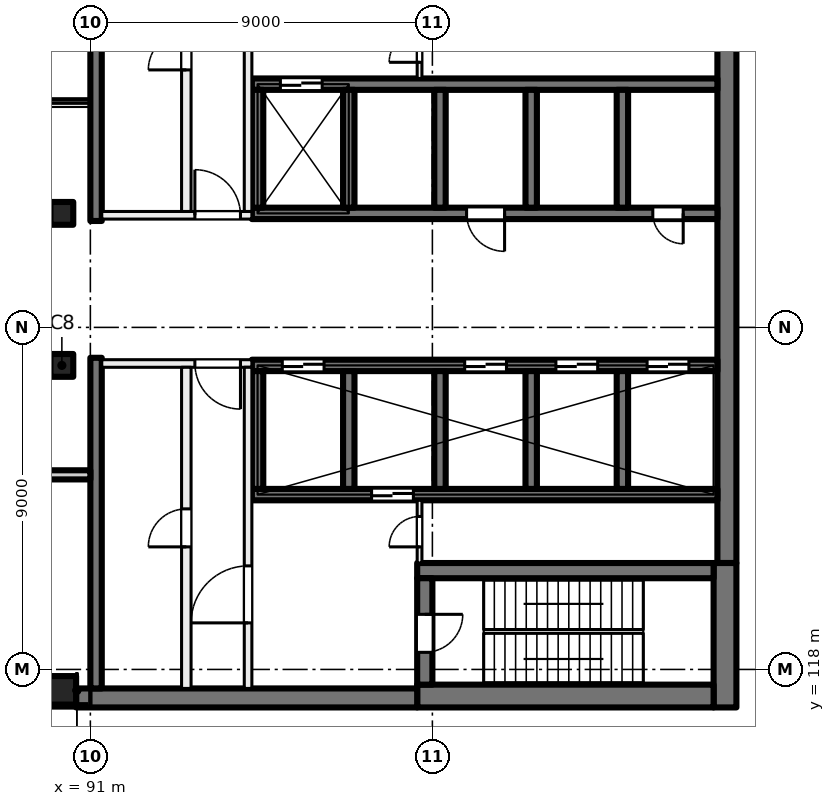
"""IFC4 building model, lengths in metres.
Left out: names, types, materials, properties, quantities, classifications, styles, units other than length and angle.
Written with IfcOpenShell. Run it as: python <this file> out.ifc"""

import sys

from ifc_helpers import new_model, si_unit, direction, frame, frame_2d, origin, origin_2d, place, context, subcontext, project, spatial, rectangle, extrude, element, fill, save


model = new_model("IFC4")
c1 = context("Model", 3, precision=1e-05, world=origin(), true_north=direction((0.0, 1.0)))
c2 = subcontext(c1, "Body", "Model", "MODEL_VIEW")
j1 = project(units=[si_unit("LENGTHUNIT", "METRE"), si_unit("PLANEANGLEUNIT", "RADIAN")], contexts=[c1])
p1 = place(None, origin())
s1 = spatial("IfcSite", under=j1, at=p1, CompositionType="ELEMENT")
p2 = place(p1, origin())
s2 = spatial("IfcBuilding", under=s1, at=p2, CompositionType="ELEMENT")
p3 = place(p2, frame((0.0, 0.0, 236.0)))
s3 = spatial("IfcBuildingStorey", under=s2, at=p3, CompositionType="ELEMENT", Elevation=236.0)
for number, where, z_axis, x_axis in (
    (1, (90.25, 130.0, 0.0), (0.0, 0.0, 1.0), (1.0, 0.0, 0.0)),
    (2, (90.25, 126.0, 0.0), (0.0, 0.0, 1.0), (1.0, 0.0, 0.0)),
):
    element("IfcColumn", number, at=place(p3, frame(where, z_axis=z_axis, x_axis=x_axis)), inside=s3, PredefinedType="COLUMN", context=c2, shape_type="SweptSolid", body=[
        extrude(rectangle(XDim=0.6, YDim=0.6, at=origin_2d()), origin(), (0.0, 0.0, 1.0), 5.5),
    ])
p4 = place(p3, frame((90.25, 117.45, 0.0), z_axis=(0.0, 0.0, 1.0), x_axis=(1.0, 0.0, 0.0)))
e3 = element("IfcColumn", 3, at=p4, inside=s3, PredefinedType="COLUMN", context=c2, shape_type="SweptSolid", body=[
    extrude(rectangle(XDim=0.75, YDim=0.75, at=origin_2d()), origin(), (0.0, 0.0, 1.0), 5.5),
])
p5 = place(p3, frame((107.75, 135.2, 0.0), z_axis=(0.0, 0.0, 1.0), x_axis=(0.0, -1.0, 0.0)))
e4 = element("IfcWall", 4, at=p5, inside=s3, PredefinedType="SHEAR", context=c2, shape_type="SweptSolid", body=[
    extrude(rectangle(XDim=14.4, YDim=0.5, at=frame_2d((7.2, 0.0))), origin(), (0.0, 0.0, 1.0), 5.5),
])
p6 = place(p3, frame((107.7, 120.8, 0.0), z_axis=(0.0, 0.0, 1.0), x_axis=(0.0, -1.0, 0.0)))
e5 = element("IfcWall", 5, at=p6, inside=s3, PredefinedType="SHEAR", context=c2, shape_type="SweptSolid", body=[
    extrude(rectangle(XDim=3.8, YDim=0.6, at=frame_2d((1.9, 0.0))), origin(), (0.0, 0.0, 1.0), 5.5),
])
p7 = place(p3, frame((107.4, 117.3, 0.0), z_axis=(0.0, 0.0, 1.0), x_axis=(-1.0, 0.0, 0.0)))
e6 = element("IfcWall", 6, at=p7, inside=s3, PredefinedType="SHEAR", context=c2, shape_type="SweptSolid", body=[
    extrude(rectangle(XDim=7.8, YDim=0.6, at=frame_2d((3.9, 0.0))), origin(), (0.0, 0.0, 1.0), 5.5),
])
p8 = place(p3, frame((99.6, 117.25, 0.0), z_axis=(0.0, 0.0, 1.0), x_axis=(-1.0, 0.0, 0.0)))
e7 = element("IfcWall", 7, at=p8, inside=s3, PredefinedType="SHEAR", context=c2, shape_type="SweptSolid", body=[
    extrude(rectangle(XDim=8.975, YDim=0.5, at=frame_2d((4.488, 0.0))), origin(), (0.0, 0.0, 1.0), 5.5),
])
p9 = place(p3, frame((107.4, 120.6, 0.0), z_axis=(0.0, 0.0, 1.0), x_axis=(-1.0, 0.0, 0.0)))
e8 = element("IfcWall", 8, at=p9, inside=s3, PredefinedType="SHEAR", context=c2, shape_type="SweptSolid", body=[
    extrude(rectangle(XDim=7.8, YDim=0.4, at=frame_2d((3.9, 0.0))), origin(), (0.0, 0.0, 1.0), 5.5),
])
p10 = place(p3, frame((99.8, 120.4, 0.0), z_axis=(0.0, 0.0, 1.0), x_axis=(0.0, -1.0, 0.0)))
e9 = element("IfcWall", 9, at=p10, inside=s3, PredefinedType="SHEAR", context=c2, shape_type="SweptSolid", body=[
    extrude(rectangle(XDim=2.8, YDim=0.4, at=frame_2d((1.4, 0.0))), origin(), (0.0, 0.0, 1.0), 5.5),
])
p11 = place(p10, frame((0.95, 0.0, 0.0)))
e10 = element("IfcOpeningElement", 10, at=p11, cuts=e9, PredefinedType="OPENING", context=c2, shape_type="SweptSolid", body=[
    extrude(rectangle(XDim=1.0, YDim=2.1, at=frame_2d((0.5, 1.05))), frame((0.0, 0.21, 0.0), z_axis=(0.0, -1.0, 0.0), x_axis=(1.0, 0.0, 0.0)), (0.0, 0.0, 1.0), 0.42),
])
p12 = place(p3, frame((107.5, 130.0, 0.0), z_axis=(0.0, 0.0, 1.0), x_axis=(-1.0, 0.0, 0.0)))
e11 = element("IfcWall", 11, at=p12, inside=s3, PredefinedType="SHEAR", context=c2, shape_type="SweptSolid", body=[
    extrude(rectangle(XDim=12.25, YDim=0.3, at=frame_2d((6.125, 0.0))), origin(), (0.0, 0.0, 1.0), 5.5),
])
p13 = place(p12, frame((0.9, 0.0, 0.0)))
e12 = element("IfcOpeningElement", 12, at=p13, cuts=e11, PredefinedType="OPENING", context=c2, shape_type="SweptSolid", body=[
    extrude(rectangle(XDim=0.8, YDim=2.1, at=frame_2d((0.4, 1.05))), frame((0.0, 0.16, 0.0), z_axis=(0.0, -1.0, 0.0), x_axis=(1.0, 0.0, 0.0)), (0.0, 0.0, 1.0), 0.32),
])
p14 = place(p12, frame((5.6, 0.0, 0.0)))
e13 = element("IfcOpeningElement", 13, at=p14, cuts=e11, PredefinedType="OPENING", context=c2, shape_type="SweptSolid", body=[
    extrude(rectangle(XDim=1.0, YDim=2.1, at=frame_2d((0.5, 1.05))), frame((0.0, 0.16, 0.0), z_axis=(0.0, -1.0, 0.0), x_axis=(1.0, 0.0, 0.0)), (0.0, 0.0, 1.0), 0.32),
])
p15 = place(p3, frame((107.5, 133.4, 0.0), z_axis=(0.0, 0.0, 1.0), x_axis=(-1.0, 0.0, 0.0)))
e14 = element("IfcWall", 14, at=p15, inside=s3, PredefinedType="SHEAR", context=c2, shape_type="SweptSolid", body=[
    extrude(rectangle(XDim=12.25, YDim=0.3, at=frame_2d((6.125, 0.0))), origin(), (0.0, 0.0, 1.0), 5.5),
])
p16 = place(p15, frame((10.4, 0.0, 0.0)))
e15 = element("IfcOpeningElement", 15, at=p16, cuts=e14, PredefinedType="OPENING", context=c2, shape_type="SweptSolid", body=[
    extrude(rectangle(XDim=1.1, YDim=2.1, at=frame_2d((0.55, 1.05))), frame((0.0, 0.16, 0.0), z_axis=(0.0, -1.0, 0.0), x_axis=(1.0, 0.0, 0.0)), (0.0, 0.0, 1.0), 0.32),
])
for number, where, z_axis, x_axis in (
    (16, (105.0, 133.25, 0.0), (0.0, 0.0, 1.0), (0.0, -1.0, 0.0)),
    (17, (102.6, 133.25, 0.0), (0.0, 0.0, 1.0), (0.0, -1.0, 0.0)),
    (18, (100.2, 133.25, 0.0), (0.0, 0.0, 1.0), (0.0, -1.0, 0.0)),
    (19, (97.8, 133.25, 0.0), (0.0, 0.0, 1.0), (0.0, -1.0, 0.0)),
    (20, (95.4, 133.25, 0.0), (0.0, 0.0, 1.0), (0.0, -1.0, 0.0)),
):
    element("IfcWall", number, at=place(p3, frame(where, z_axis=z_axis, x_axis=x_axis)), inside=s3, PredefinedType="SHEAR", context=c2, shape_type="SweptSolid", body=[
        extrude(rectangle(XDim=3.1, YDim=0.3, at=frame_2d((1.55, 0.0))), origin(), (0.0, 0.0, 1.0), 5.5),
    ])
p17 = place(p3, frame((107.5, 126.0, 0.0), z_axis=(0.0, 0.0, 1.0), x_axis=(-1.0, 0.0, 0.0)))
e21 = element("IfcWall", 21, at=p17, inside=s3, PredefinedType="SHEAR", context=c2, shape_type="SweptSolid", body=[
    extrude(rectangle(XDim=12.25, YDim=0.3, at=frame_2d((6.125, 0.0))), origin(), (0.0, 0.0, 1.0), 5.5),
])
p18 = place(p17, frame((0.75, 0.0, 0.0)))
e22 = element("IfcOpeningElement", 22, at=p18, cuts=e21, PredefinedType="OPENING", context=c2, shape_type="SweptSolid", body=[
    extrude(rectangle(XDim=1.1, YDim=2.1, at=frame_2d((0.55, 1.05))), frame((0.0, 0.16, 0.0), z_axis=(0.0, -1.0, 0.0), x_axis=(1.0, 0.0, 0.0)), (0.0, 0.0, 1.0), 0.32),
])
p19 = place(p17, frame((3.15, 0.0, 0.0)))
e23 = element("IfcOpeningElement", 23, at=p19, cuts=e21, PredefinedType="OPENING", context=c2, shape_type="SweptSolid", body=[
    extrude(rectangle(XDim=1.1, YDim=2.1, at=frame_2d((0.55, 1.05))), frame((0.0, 0.16, 0.0), z_axis=(0.0, -1.0, 0.0), x_axis=(1.0, 0.0, 0.0)), (0.0, 0.0, 1.0), 0.32),
])
p20 = place(p17, frame((5.55, 0.0, 0.0)))
e24 = element("IfcOpeningElement", 24, at=p20, cuts=e21, PredefinedType="OPENING", context=c2, shape_type="SweptSolid", body=[
    extrude(rectangle(XDim=1.1, YDim=2.1, at=frame_2d((0.55, 1.05))), frame((0.0, 0.16, 0.0), z_axis=(0.0, -1.0, 0.0), x_axis=(1.0, 0.0, 0.0)), (0.0, 0.0, 1.0), 0.32),
])
p21 = place(p17, frame((10.35, 0.0, 0.0)))
e25 = element("IfcOpeningElement", 25, at=p21, cuts=e21, PredefinedType="OPENING", context=c2, shape_type="SweptSolid", body=[
    extrude(rectangle(XDim=1.1, YDim=2.1, at=frame_2d((0.55, 1.05))), frame((0.0, 0.16, 0.0), z_axis=(0.0, -1.0, 0.0), x_axis=(1.0, 0.0, 0.0)), (0.0, 0.0, 1.0), 0.32),
])
p22 = place(p3, frame((107.5, 122.6, 0.0), z_axis=(0.0, 0.0, 1.0), x_axis=(-1.0, 0.0, 0.0)))
e26 = element("IfcWall", 26, at=p22, inside=s3, PredefinedType="SHEAR", context=c2, shape_type="SweptSolid", body=[
    extrude(rectangle(XDim=12.25, YDim=0.3, at=frame_2d((6.125, 0.0))), origin(), (0.0, 0.0, 1.0), 5.5),
])
p23 = place(p22, frame((8.0, 0.0, 0.0)))
e27 = element("IfcOpeningElement", 27, at=p23, cuts=e26, PredefinedType="OPENING", context=c2, shape_type="SweptSolid", body=[
    extrude(rectangle(XDim=1.1, YDim=2.1, at=frame_2d((0.55, 1.05))), frame((0.0, 0.16, 0.0), z_axis=(0.0, -1.0, 0.0), x_axis=(1.0, 0.0, 0.0)), (0.0, 0.0, 1.0), 0.32),
])
for number, where, z_axis, x_axis in (
    (28, (105.0, 125.85, 0.0), (0.0, 0.0, 1.0), (0.0, -1.0, 0.0)),
    (29, (102.6, 125.85, 0.0), (0.0, 0.0, 1.0), (0.0, -1.0, 0.0)),
    (30, (100.2, 125.85, 0.0), (0.0, 0.0, 1.0), (0.0, -1.0, 0.0)),
    (31, (97.8, 125.85, 0.0), (0.0, 0.0, 1.0), (0.0, -1.0, 0.0)),
    (32, (95.4, 125.85, 0.0), (0.0, 0.0, 1.0), (0.0, -1.0, 0.0)),
):
    element("IfcWall", number, at=place(p3, frame(where, z_axis=z_axis, x_axis=x_axis)), inside=s3, PredefinedType="SHEAR", context=c2, shape_type="SweptSolid", body=[
        extrude(rectangle(XDim=3.1, YDim=0.3, at=frame_2d((1.55, 0.0))), origin(), (0.0, 0.0, 1.0), 5.5),
    ])
for number, where, z_axis, x_axis in (
    (33, (91.15, 138.5, 0.0), (0.0, 0.0, 1.0), (0.0, -1.0, 0.0)),
    (34, (91.15, 126.2, 0.0), (0.0, 0.0, 1.0), (0.0, -1.0, 0.0)),
):
    element("IfcWall", number, at=place(p3, frame(where, z_axis=z_axis, x_axis=x_axis)), inside=s3, PredefinedType="SHEAR", context=c2, shape_type="SweptSolid", body=[
        extrude(rectangle(XDim=8.7, YDim=0.3, at=frame_2d((4.35, 0.0))), origin(), (0.0, 0.0, 1.0), 5.5),
    ])
p24 = place(p3, frame((91.0, 123.12, 0.0), z_axis=(0.0, 0.0, 1.0), x_axis=(-1.0, 0.0, 0.0)))
e35 = element("IfcWall", 35, at=p24, inside=s3, PredefinedType="SOLIDWALL", context=c2, shape_type="SweptSolid", body=[
    extrude(rectangle(XDim=4.5, YDim=0.24, at=frame_2d((2.25, 0.0))), origin(), (0.0, 0.0, 1.0), 5.125),
])
p25 = place(p24, frame((1.35, 0.0, 0.0)))
e36 = element("IfcOpeningElement", 36, at=p25, cuts=e35, PredefinedType="OPENING", context=c2, shape_type="SweptSolid", body=[
    extrude(rectangle(XDim=1.8, YDim=2.4, at=frame_2d((0.9, 1.2))), frame((0.0, 0.13, 0.0), z_axis=(0.0, -1.0, 0.0), x_axis=(1.0, 0.0, 0.0)), (0.0, 0.0, 1.0), 0.26),
])
p26 = place(p3, frame((95.25, 126.05, 0.0), z_axis=(0.0, 0.0, 1.0), x_axis=(-1.0, 0.0, 0.0)))
e37 = element("IfcWall", 37, at=p26, inside=s3, PredefinedType="PARTITIONING", context=c2, shape_type="SweptSolid", body=[
    extrude(rectangle(XDim=3.95, YDim=0.2, at=frame_2d((1.975, 0.0))), origin(), (0.0, 0.0, 1.0), 5.125),
])
p27 = place(p26, frame((0.3, 0.0, 0.0)))
e38 = element("IfcOpeningElement", 38, at=p27, cuts=e37, PredefinedType="OPENING", context=c2, shape_type="SweptSolid", body=[
    extrude(rectangle(XDim=1.2, YDim=2.1, at=frame_2d((0.6, 1.05))), frame((0.0, 0.11, 0.0), z_axis=(0.0, -1.0, 0.0), x_axis=(1.0, 0.0, 0.0)), (0.0, 0.0, 1.0), 0.22),
])
p28 = place(p3, frame((95.15, 117.5, 0.0), z_axis=(0.0, 0.0, 1.0), x_axis=(0.0, 1.0, 0.0)))
e39 = element("IfcWall", 39, at=p28, inside=s3, PredefinedType="PARTITIONING", context=c2, shape_type="SweptSolid", body=[
    extrude(rectangle(XDim=8.45, YDim=0.2, at=frame_2d((4.225, 0.0))), origin(), (0.0, 0.0, 1.0), 5.125),
])
p29 = place(p28, frame((1.725, 0.0, 0.0)))
e40 = element("IfcOpeningElement", 40, at=p29, cuts=e39, PredefinedType="OPENING", context=c2, shape_type="SweptSolid", body=[
    extrude(rectangle(XDim=1.5, YDim=2.1, at=frame_2d((0.75, 1.05))), frame((0.0, 0.11, 0.0), z_axis=(0.0, -1.0, 0.0), x_axis=(1.0, 0.0, 0.0)), (0.0, 0.0, 1.0), 0.22),
])
p30 = place(p3, frame((93.525, 117.5, 0.0), z_axis=(0.0, 0.0, 1.0), x_axis=(0.0, 1.0, 0.0)))
e41 = element("IfcWall", 41, at=p30, inside=s3, PredefinedType="PARTITIONING", context=c2, shape_type="SweptSolid", body=[
    extrude(rectangle(XDim=8.45, YDim=0.25, at=frame_2d((4.225, 0.0))), origin(), (0.0, 0.0, 1.0), 5.125),
])
p31 = place(p30, frame((3.725, 0.0, 0.0)))
e42 = element("IfcOpeningElement", 42, at=p31, cuts=e41, PredefinedType="OPENING", context=c2, shape_type="SweptSolid", body=[
    extrude(rectangle(XDim=1.0, YDim=2.1, at=frame_2d((0.5, 1.05))), frame((0.0, 0.135, 0.0), z_axis=(0.0, -1.0, 0.0), x_axis=(1.0, 0.0, 0.0)), (0.0, 0.0, 1.0), 0.27),
])
p32 = place(p3, frame((99.663, 120.8, 0.0), z_axis=(0.0, 0.0, 1.0), x_axis=(0.0, 1.0, 0.0)))
e43 = element("IfcWall", 43, at=p32, inside=s3, PredefinedType="PARTITIONING", context=c2, shape_type="SweptSolid", body=[
    extrude(rectangle(XDim=1.65, YDim=0.125, at=frame_2d((0.825, 0.0))), origin(), (0.0, 0.0, 1.0), 5.125),
])
p33 = place(p32, frame((0.425, 0.0, 0.0)))
e44 = element("IfcOpeningElement", 44, at=p33, cuts=e43, PredefinedType="OPENING", context=c2, shape_type="SweptSolid", body=[
    extrude(rectangle(XDim=0.8, YDim=2.1, at=frame_2d((0.4, 1.05))), frame((0.0, 0.073, 0.0), z_axis=(0.0, -1.0, 0.0), x_axis=(1.0, 0.0, 0.0)), (0.0, 0.0, 1.0), 0.145),
])
p34 = place(p3, frame((91.3, 129.95, 0.0), z_axis=(0.0, 0.0, 1.0), x_axis=(1.0, 0.0, 0.0)))
e45 = element("IfcWall", 45, at=p34, inside=s3, PredefinedType="PARTITIONING", context=c2, shape_type="SweptSolid", body=[
    extrude(rectangle(XDim=3.95, YDim=0.2, at=frame_2d((1.975, 0.0))), origin(), (0.0, 0.0, 1.0), 5.125),
])
p35 = place(p34, frame((2.45, 0.0, 0.0)))
e46 = element("IfcOpeningElement", 46, at=p35, cuts=e45, PredefinedType="OPENING", context=c2, shape_type="SweptSolid", body=[
    extrude(rectangle(XDim=1.2, YDim=2.1, at=frame_2d((0.6, 1.05))), frame((0.0, 0.11, 0.0), z_axis=(0.0, -1.0, 0.0), x_axis=(1.0, 0.0, 0.0)), (0.0, 0.0, 1.0), 0.22),
])
p36 = place(p3, frame((95.15, 130.05, 0.0), z_axis=(0.0, 0.0, 1.0), x_axis=(0.0, 1.0, 0.0)))
e47 = element("IfcWall", 47, at=p36, inside=s3, PredefinedType="PARTITIONING", context=c2, shape_type="SweptSolid", body=[
    extrude(rectangle(XDim=8.45, YDim=0.2, at=frame_2d((4.225, 0.0))), origin(), (0.0, 0.0, 1.0), 5.125),
])
p37 = place(p36, frame((5.225, 0.0, 0.0)))
e48 = element("IfcOpeningElement", 48, at=p37, cuts=e47, PredefinedType="OPENING", context=c2, shape_type="SweptSolid", body=[
    extrude(rectangle(XDim=1.5, YDim=2.1, at=frame_2d((0.75, 1.05))), frame((0.0, 0.11, 0.0), z_axis=(0.0, -1.0, 0.0), x_axis=(1.0, 0.0, 0.0)), (0.0, 0.0, 1.0), 0.22),
])
p38 = place(p3, frame((93.525, 130.05, 0.0), z_axis=(0.0, 0.0, 1.0), x_axis=(0.0, 1.0, 0.0)))
e49 = element("IfcWall", 49, at=p38, inside=s3, PredefinedType="PARTITIONING", context=c2, shape_type="SweptSolid", body=[
    extrude(rectangle(XDim=8.45, YDim=0.25, at=frame_2d((4.225, 0.0))), origin(), (0.0, 0.0, 1.0), 5.125),
])
p39 = place(p38, frame((3.725, 0.0, 0.0)))
e50 = element("IfcOpeningElement", 50, at=p39, cuts=e49, PredefinedType="OPENING", context=c2, shape_type="SweptSolid", body=[
    extrude(rectangle(XDim=1.0, YDim=2.1, at=frame_2d((0.5, 1.05))), frame((0.0, 0.135, 0.0), z_axis=(0.0, -1.0, 0.0), x_axis=(1.0, 0.0, 0.0)), (0.0, 0.0, 1.0), 0.27),
])
p40 = place(p3, frame((99.663, 133.55, 0.0), z_axis=(0.0, 0.0, 1.0), x_axis=(0.0, 1.0, 0.0)))
e51 = element("IfcWall", 51, at=p40, inside=s3, PredefinedType="PARTITIONING", context=c2, shape_type="SweptSolid", body=[
    extrude(rectangle(XDim=1.65, YDim=0.125, at=frame_2d((0.825, 0.0))), origin(), (0.0, 0.0, 1.0), 5.125),
])
p41 = place(p40, frame((0.425, 0.0, 0.0)))
e52 = element("IfcOpeningElement", 52, at=p41, cuts=e51, PredefinedType="OPENING", context=c2, shape_type="SweptSolid", body=[
    extrude(rectangle(XDim=0.8, YDim=2.1, at=frame_2d((0.4, 1.05))), frame((0.0, 0.073, 0.0), z_axis=(0.0, -1.0, 0.0), x_axis=(1.0, 0.0, 0.0)), (0.0, 0.0, 1.0), 0.145),
])
p42 = place(p18, origin())
e53 = element("IfcDoor", 53, at=p42, inside=s3, OperationType="DOUBLE_DOOR_SLIDING", PredefinedType="DOOR", context=c2, shape_type="SweptSolid", body=[
    extrude(rectangle(XDim=1.1, YDim=2.1, at=frame_2d((0.55, 1.05))), frame((0.0, 0.025, 0.0), z_axis=(0.0, -1.0, 0.0), x_axis=(1.0, 0.0, 0.0)), (0.0, 0.0, 1.0), 0.05),
])
fill(e22, e53)
p43 = place(p19, origin())
e54 = element("IfcDoor", 54, at=p43, inside=s3, OperationType="DOUBLE_DOOR_SLIDING", PredefinedType="DOOR", context=c2, shape_type="SweptSolid", body=[
    extrude(rectangle(XDim=1.1, YDim=2.1, at=frame_2d((0.55, 1.05))), frame((0.0, 0.025, 0.0), z_axis=(0.0, -1.0, 0.0), x_axis=(1.0, 0.0, 0.0)), (0.0, 0.0, 1.0), 0.05),
])
fill(e23, e54)
p44 = place(p20, origin())
e55 = element("IfcDoor", 55, at=p44, inside=s3, OperationType="DOUBLE_DOOR_SLIDING", PredefinedType="DOOR", context=c2, shape_type="SweptSolid", body=[
    extrude(rectangle(XDim=1.1, YDim=2.1, at=frame_2d((0.55, 1.05))), frame((0.0, 0.025, 0.0), z_axis=(0.0, -1.0, 0.0), x_axis=(1.0, 0.0, 0.0)), (0.0, 0.0, 1.0), 0.05),
])
fill(e24, e55)
p45 = place(p21, origin())
e56 = element("IfcDoor", 56, at=p45, inside=s3, OperationType="DOUBLE_DOOR_SLIDING", PredefinedType="DOOR", context=c2, shape_type="SweptSolid", body=[
    extrude(rectangle(XDim=1.1, YDim=2.1, at=frame_2d((0.55, 1.05))), frame((0.0, 0.025, 0.0), z_axis=(0.0, -1.0, 0.0), x_axis=(1.0, 0.0, 0.0)), (0.0, 0.0, 1.0), 0.05),
])
fill(e25, e56)
p46 = place(p13, origin())
e57 = element("IfcDoor", 57, at=p46, inside=s3, OperationType="SINGLE_SWING_LEFT", PredefinedType="DOOR", context=c2, shape_type="SweptSolid", body=[
    extrude(rectangle(XDim=0.8, YDim=2.1, at=frame_2d((0.4, 1.05))), frame((0.0, 0.025, 0.0), z_axis=(0.0, -1.0, 0.0), x_axis=(1.0, 0.0, 0.0)), (0.0, 0.0, 1.0), 0.05),
])
fill(e12, e57)
p47 = place(p14, origin())
e58 = element("IfcDoor", 58, at=p47, inside=s3, OperationType="SINGLE_SWING_RIGHT", PredefinedType="DOOR", context=c2, shape_type="SweptSolid", body=[
    extrude(rectangle(XDim=1.0, YDim=2.1, at=frame_2d((0.5, 1.05))), frame((0.0, 0.025, 0.0), z_axis=(0.0, -1.0, 0.0), x_axis=(1.0, 0.0, 0.0)), (0.0, 0.0, 1.0), 0.05),
])
fill(e13, e58)
p48 = place(p27, origin())
e59 = element("IfcDoor", 59, at=p48, inside=s3, OperationType="DOUBLE_DOOR_SINGLE_SWING", PredefinedType="DOOR", context=c2, shape_type="SweptSolid", body=[
    extrude(rectangle(XDim=1.2, YDim=2.1, at=frame_2d((0.6, 1.05))), frame((0.0, 0.025, 0.0), z_axis=(0.0, -1.0, 0.0), x_axis=(1.0, 0.0, 0.0)), (0.0, 0.0, 1.0), 0.05),
])
fill(e38, e59)
p49 = place(p29, origin())
e60 = element("IfcDoor", 60, at=p49, inside=s3, OperationType="DOUBLE_DOOR_SINGLE_SWING", PredefinedType="DOOR", context=c2, shape_type="SweptSolid", body=[
    extrude(rectangle(XDim=1.5, YDim=2.1, at=frame_2d((0.75, 1.05))), frame((0.0, 0.025, 0.0), z_axis=(0.0, -1.0, 0.0), x_axis=(1.0, 0.0, 0.0)), (0.0, 0.0, 1.0), 0.05),
])
fill(e40, e60)
p50 = place(p11, origin())
e61 = element("IfcDoor", 61, at=p50, inside=s3, OperationType="SINGLE_SWING_LEFT", PredefinedType="DOOR", context=c2, shape_type="SweptSolid", body=[
    extrude(rectangle(XDim=1.0, YDim=2.1, at=frame_2d((0.5, 1.05))), frame((0.0, 0.025, 0.0), z_axis=(0.0, -1.0, 0.0), x_axis=(1.0, 0.0, 0.0)), (0.0, 0.0, 1.0), 0.05),
])
fill(e10, e61)
p51 = place(p33, origin())
e62 = element("IfcDoor", 62, at=p51, inside=s3, OperationType="SINGLE_SWING_RIGHT", PredefinedType="DOOR", context=c2, shape_type="SweptSolid", body=[
    extrude(rectangle(XDim=0.8, YDim=2.1, at=frame_2d((0.4, 1.05))), frame((0.0, 0.025, 0.0), z_axis=(0.0, -1.0, 0.0), x_axis=(1.0, 0.0, 0.0)), (0.0, 0.0, 1.0), 0.05),
])
fill(e44, e62)
p52 = place(p31, origin())
e63 = element("IfcDoor", 63, at=p52, inside=s3, OperationType="SINGLE_SWING_LEFT", PredefinedType="DOOR", context=c2, shape_type="SweptSolid", body=[
    extrude(rectangle(XDim=1.0, YDim=2.1, at=frame_2d((0.5, 1.05))), frame((0.0, 0.025, 0.0), z_axis=(0.0, -1.0, 0.0), x_axis=(1.0, 0.0, 0.0)), (0.0, 0.0, 1.0), 0.05),
])
fill(e42, e63)
p53 = place(p35, origin())
e64 = element("IfcDoor", 64, at=p53, inside=s3, OperationType="DOUBLE_DOOR_SINGLE_SWING", PredefinedType="DOOR", context=c2, shape_type="SweptSolid", body=[
    extrude(rectangle(XDim=1.2, YDim=2.1, at=frame_2d((0.6, 1.05))), frame((0.0, 0.025, 0.0), z_axis=(0.0, -1.0, 0.0), x_axis=(1.0, 0.0, 0.0)), (0.0, 0.0, 1.0), 0.05),
])
fill(e46, e64)
p54 = place(p41, origin())
e65 = element("IfcDoor", 65, at=p54, inside=s3, OperationType="SINGLE_SWING_LEFT", PredefinedType="DOOR", context=c2, shape_type="SweptSolid", body=[
    extrude(rectangle(XDim=0.8, YDim=2.1, at=frame_2d((0.4, 1.05))), frame((0.0, 0.025, 0.0), z_axis=(0.0, -1.0, 0.0), x_axis=(1.0, 0.0, 0.0)), (0.0, 0.0, 1.0), 0.05),
])
fill(e52, e65)
p55 = place(p39, origin())
e66 = element("IfcDoor", 66, at=p55, inside=s3, OperationType="SINGLE_SWING_RIGHT", PredefinedType="DOOR", context=c2, shape_type="SweptSolid", body=[
    extrude(rectangle(XDim=1.0, YDim=2.1, at=frame_2d((0.5, 1.05))), frame((0.0, 0.025, 0.0), z_axis=(0.0, -1.0, 0.0), x_axis=(1.0, 0.0, 0.0)), (0.0, 0.0, 1.0), 0.05),
])
fill(e50, e66)
p56 = place(p16, origin())
e67 = element("IfcDoor", 67, at=p56, inside=s3, OperationType="DOUBLE_DOOR_SLIDING", PredefinedType="DOOR", context=c2, shape_type="SweptSolid", body=[
    extrude(rectangle(XDim=1.1, YDim=2.1, at=frame_2d((0.55, 1.05))), frame((0.0, 0.025, 0.0), z_axis=(0.0, -1.0, 0.0), x_axis=(1.0, 0.0, 0.0)), (0.0, 0.0, 1.0), 0.05),
])
fill(e15, e67)
p57 = place(p23, origin())
e68 = element("IfcDoor", 68, at=p57, inside=s3, OperationType="DOUBLE_DOOR_SLIDING", PredefinedType="DOOR", context=c2, shape_type="SweptSolid", body=[
    extrude(rectangle(XDim=1.1, YDim=2.1, at=frame_2d((0.55, 1.05))), frame((0.0, 0.025, 0.0), z_axis=(0.0, -1.0, 0.0), x_axis=(1.0, 0.0, 0.0)), (0.0, 0.0, 1.0), 0.05),
])
fill(e27, e68)
save(model, sys.argv[1])
